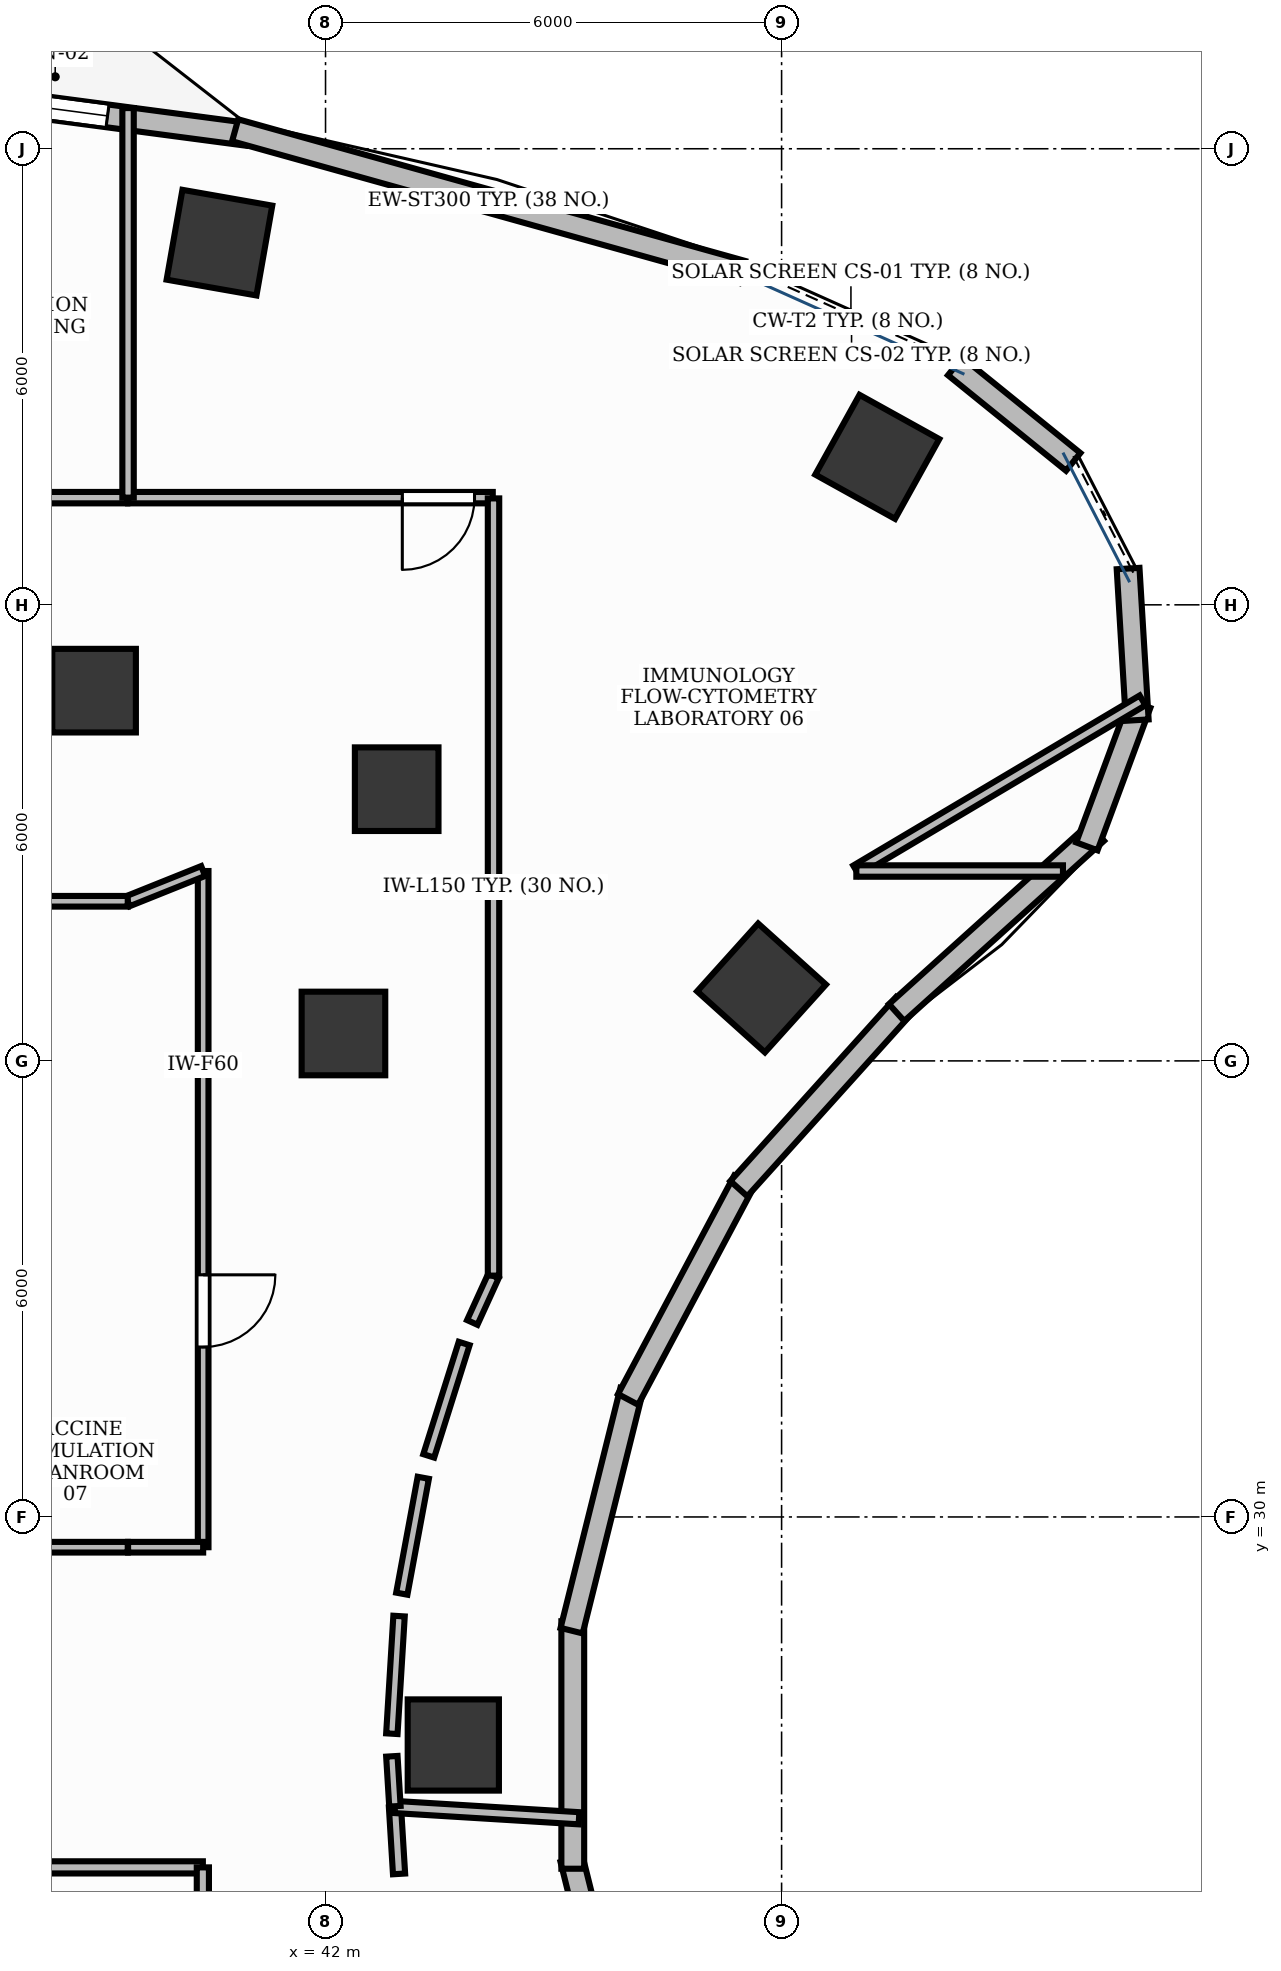
"""IFC4 building model, lengths in metres.
Left out: names, types, materials, properties, quantities, classifications, styles, units other than length and angle.
Written with IfcOpenShell. Run it as: python <this file> out.ifc"""

import sys

from ifc_helpers import new_model, si_unit, direction, frame, frame_2d, origin, origin_2d, place, context, subcontext, project, spatial, rectangle, extrude, element, fill, save


model = new_model("IFC4")
c1 = context("Model", 3, precision=1e-05, world=origin(), true_north=direction((0.0, 1.0)))
c2 = subcontext(c1, "Body", "Model", "MODEL_VIEW")
j1 = project(units=[si_unit("LENGTHUNIT", "METRE"), si_unit("PLANEANGLEUNIT", "RADIAN")], contexts=[c1])
p1 = place(None, origin())
s1 = spatial("IfcSite", under=j1, at=p1, CompositionType="ELEMENT")
p2 = place(p1, origin())
s2 = spatial("IfcBuilding", under=s1, at=p2, CompositionType="ELEMENT")
p3 = place(p2, frame((0.0, 0.0, 94.2)))
s3 = spatial("IfcBuildingStorey", under=s2, at=p3, CompositionType="ELEMENT", Elevation=94.2)
p4 = place(p3, frame((49.259, 43.947, -0.0), z_axis=(0.0, 0.0, 1.0), x_axis=(-0.874535078577, 0.484962262797, 0.0)))
e1 = element("IfcColumn", 1, at=p4, inside=s3, PredefinedType="COLUMN", context=c2, shape_type="SweptSolid", body=[
    extrude(rectangle(XDim=1.2, YDim=1.2, at=origin_2d()), origin(), (0.0, 0.0, 1.0), 3.901),
])
p5 = place(p3, frame((42.936, 39.575, -0.0), z_axis=(0.0, 0.0, 1.0), x_axis=(1.0, 0.0, 0.0)))
e2 = element("IfcColumn", 2, at=p5, inside=s3, PredefinedType="COLUMN", context=c2, shape_type="SweptSolid", body=[
    extrude(rectangle(XDim=1.1, YDim=1.1, at=origin_2d()), origin(), (0.0, 0.0, 1.0), 3.901),
])
p6 = place(p3, frame((40.604, 46.765, -0.0), z_axis=(0.0, 0.0, 1.0), x_axis=(-0.984868307662, 0.173304404339, 0.0)))
e3 = element("IfcColumn", 3, at=p6, inside=s3, PredefinedType="COLUMN", context=c2, shape_type="SweptSolid", body=[
    extrude(rectangle(XDim=1.2, YDim=1.2, at=origin_2d()), origin(), (0.0, 0.0, 1.0), 3.901),
])
p7 = place(p3, frame((38.955, 40.871, -0.0), z_axis=(0.0, 0.0, 1.0), x_axis=(1.0, 0.0, 0.0)))
e4 = element("IfcColumn", 4, at=p7, inside=s3, PredefinedType="COLUMN", context=c2, shape_type="SweptSolid", body=[
    extrude(rectangle(XDim=1.1, YDim=1.1, at=origin_2d()), origin(), (0.0, 0.0, 1.0), 3.901),
])
for number, where, z_axis, x_axis in (
    (5, (43.681, 27.0, -0.0), (0.0, 0.0, 1.0), (0.0, 1.0, 0.0)),
    (6, (47.736, 36.96, -0.0), (0.0, 0.0, 1.0), (0.669, 0.743, 0.0)),
):
    element("IfcColumn", number, at=place(p3, frame(where, z_axis=z_axis, x_axis=x_axis)), inside=s3, PredefinedType="COLUMN", context=c2, shape_type="SweptSolid", body=[
        extrude(rectangle(XDim=1.2, YDim=1.2, at=origin_2d()), origin(), (0.0, 0.0, 1.0), 3.901),
    ])
p8 = place(p3, frame((42.236, 36.361, -0.0), z_axis=(0.0, 0.0, 1.0), x_axis=(1.0, 0.0, 0.0)))
e7 = element("IfcColumn", 7, at=p8, inside=s3, PredefinedType="COLUMN", context=c2, shape_type="SweptSolid", body=[
    extrude(rectangle(XDim=1.1, YDim=1.1, at=origin_2d()), origin(), (0.0, 0.0, 1.0), 3.901),
])
p9 = place(p3, frame((40.964, 48.19, 0.0), z_axis=(0.0, 0.0, 1.0), x_axis=(-0.991369257822, 0.131099178664, 0.0)))
e8 = element("IfcWall", 8, at=p9, inside=s3, PredefinedType="STANDARD", context=c2, shape_type="SweptSolid", body=[
    extrude(rectangle(XDim=3.575, YDim=0.3, at=frame_2d((1.788, 0.0))), origin(), (0.0, 0.0, 1.0), 3.47),
])
p10 = place(p9, frame((1.848, 0.0, 0.95)))
e9 = element("IfcOpeningElement", 9, at=p10, cuts=e8, PredefinedType="OPENING", context=c2, shape_type="SweptSolid", body=[
    extrude(rectangle(XDim=1.5, YDim=1.8, at=frame_2d((0.75, 0.9))), frame((0.0, 0.165, 0.0), z_axis=(0.0, -1.0, 0.0), x_axis=(1.0, 0.0, 0.0)), (0.0, 0.0, 1.0), 0.33),
])
p11 = place(p3, frame((47.479, 46.38, 0.0), z_axis=(0.0, 0.0, 1.0), x_axis=(-0.963116215402, 0.269085777459, 0.0)))
e10 = element("IfcWall", 10, at=p11, inside=s3, PredefinedType="STANDARD", context=c2, shape_type="SweptSolid", body=[
    extrude(rectangle(XDim=6.924, YDim=0.3, at=frame_2d((3.462, 0.0))), origin(), (0.0, 0.0, 1.0), 3.9),
])
p12 = place(p3, frame((46.025, 22.337, 0.0), z_axis=(0.0, 0.0, 1.0), x_axis=(-0.241900409149, 0.970301083197, 0.0)))
e11 = element("IfcWall", 11, at=p12, inside=s3, PredefinedType="STANDARD", context=c2, shape_type="SweptSolid", body=[
    extrude(rectangle(XDim=3.256, YDim=0.3, at=frame_2d((1.628, 0.0))), origin(), (0.0, 0.0, 1.0), 3.9),
])
p13 = place(p3, frame((45.253, 25.372, 0.0), z_axis=(0.0, 0.0, 1.0), x_axis=(0.0, 1.0, 0.0)))
e12 = element("IfcWall", 12, at=p13, inside=s3, PredefinedType="STANDARD", context=c2, shape_type="SweptSolid", body=[
    extrude(rectangle(XDim=3.255, YDim=0.3, at=frame_2d((1.628, 0.0))), origin(), (0.0, 0.0, 1.0), 3.9),
])
p14 = place(p3, frame((45.238, 28.504, 0.0), z_axis=(0.0, 0.0, 1.0), x_axis=(0.241900409149, 0.970301083197, 0.0)))
e13 = element("IfcWall", 13, at=p14, inside=s3, PredefinedType="STANDARD", context=c2, shape_type="SweptSolid", body=[
    extrude(rectangle(XDim=3.256, YDim=0.3, at=frame_2d((1.628, 0.0))), origin(), (0.0, 0.0, 1.0), 3.9),
])
p15 = place(p3, frame((45.98, 31.547, 0.0), z_axis=(0.0, 0.0, 1.0), x_axis=(0.469451284634, 0.882958374645, 0.0)))
e14 = element("IfcWall", 14, at=p15, inside=s3, PredefinedType="STANDARD", context=c2, shape_type="SweptSolid", body=[
    extrude(rectangle(XDim=3.256, YDim=0.3, at=frame_2d((1.628, 0.0))), origin(), (0.0, 0.0, 1.0), 3.9),
])
p16 = place(p3, frame((47.437, 34.319, 0.0), z_axis=(0.0, 0.0, 1.0), x_axis=(0.669167727967, 0.743111399353, 0.0)))
e15 = element("IfcWall", 15, at=p16, inside=s3, PredefinedType="STANDARD", context=c2, shape_type="SweptSolid", body=[
    extrude(rectangle(XDim=3.255, YDim=0.3, at=frame_2d((1.628, 0.0))), origin(), (0.0, 0.0, 1.0), 3.9),
])
p17 = place(p3, frame((49.513, 36.636, 0.0), z_axis=(0.0, 0.0, 1.0), x_axis=(0.74255963233, 0.669779958221, 0.0)))
e16 = element("IfcWall", 16, at=p17, inside=s3, PredefinedType="STANDARD", context=c2, shape_type="SweptSolid", body=[
    extrude(rectangle(XDim=3.539, YDim=0.3, at=frame_2d((1.77, 0.0))), origin(), (0.0, 0.0, 1.0), 3.9),
])
p18 = place(p3, frame((52.016, 38.822, 0.0), z_axis=(0.0, 0.0, 1.0), x_axis=(0.347370087337, 0.937728117539, 0.0)))
e17 = element("IfcWall", 17, at=p18, inside=s3, PredefinedType="STANDARD", context=c2, shape_type="SweptSolid", body=[
    extrude(rectangle(XDim=1.997, YDim=0.3, at=frame_2d((0.999, 0.0))), origin(), (0.0, 0.0, 1.0), 3.9),
])
for number, where, z_axis, x_axis in (
    (18, (52.679, 40.483, 0.0), (0.0, 0.0, 1.0), (-0.06, 0.998, 0.0)),
    (19, (51.836, 43.881, 0.0), (0.0, 0.0, 1.0), (-0.777, 0.629, 0.0)),
):
    element("IfcWall", number, at=place(p3, frame(where, z_axis=z_axis, x_axis=x_axis)), inside=s3, PredefinedType="STANDARD", context=c2, shape_type="SweptSolid", body=[
        extrude(rectangle(XDim=1.998, YDim=0.3, at=frame_2d((0.999, 0.0))), origin(), (0.0, 0.0, 1.0), 3.9),
    ])
p19 = place(p3, frame((44.2, 43.41, 0.0), z_axis=(0.0, 0.0, 1.0), x_axis=(-1.0, 0.0, 0.0)))
e20 = element("IfcWall", 20, at=p19, inside=s3, PredefinedType="PARTITIONING", context=c2, shape_type="SweptSolid", body=[
    extrude(rectangle(XDim=4.798, YDim=0.15, at=frame_2d((2.399, 0.0))), origin(), (0.0, 0.0, 1.0), 2.91),
])
p20 = place(p19, frame((0.24, 0.0, 0.0)))
e21 = element("IfcOpeningElement", 21, at=p20, cuts=e20, PredefinedType="OPENING", context=c2, shape_type="SweptSolid", body=[
    extrude(rectangle(XDim=0.95, YDim=2.15, at=frame_2d((0.475, 1.075))), frame((0.0, 0.09, 0.0), z_axis=(0.0, -1.0, 0.0), x_axis=(1.0, 0.0, 0.0)), (0.0, 0.0, 1.0), 0.18),
])
p21 = place(p3, frame((40.39, 38.498, 0.0), z_axis=(0.0, 0.0, 1.0), x_axis=(0.0, -1.0, 0.0)))
e22 = element("IfcWall", 22, at=p21, inside=s3, PredefinedType="PARTITIONING", context=c2, shape_type="SweptSolid", body=[
    extrude(rectangle(XDim=8.896, YDim=0.14, at=frame_2d((4.448, 0.0))), origin(), (0.0, 0.0, 1.0), 2.91),
])
p22 = place(p21, frame((5.312, 0.0, 0.0)))
e23 = element("IfcOpeningElement", 23, at=p22, cuts=e22, PredefinedType="OPENING", context=c2, shape_type="SweptSolid", body=[
    extrude(rectangle(XDim=0.95, YDim=2.15, at=frame_2d((0.475, 1.075))), frame((0.0, 0.085, 0.0), z_axis=(0.0, -1.0, 0.0), x_axis=(1.0, 0.0, 0.0)), (0.0, 0.0, 1.0), 0.17),
])
p23 = place(p3, frame((39.392, 43.41, 0.0), z_axis=(0.0, 0.0, 1.0), x_axis=(-1.0, 0.0, 0.0)))
e24 = element("IfcWall", 24, at=p23, inside=s3, PredefinedType="PARTITIONING", context=c2, shape_type="SweptSolid", body=[
    extrude(rectangle(XDim=4.196, YDim=0.15, at=frame_2d((2.098, 0.0))), origin(), (0.0, 0.0, 1.0), 2.91),
])
p24 = place(p23, frame((2.748, 0.0, 0.0)))
e25 = element("IfcOpeningElement", 25, at=p24, cuts=e24, PredefinedType="OPENING", context=c2, shape_type="SweptSolid", body=[
    extrude(rectangle(XDim=0.95, YDim=2.15, at=frame_2d((0.475, 1.075))), frame((0.0, 0.09, 0.0), z_axis=(0.0, -1.0, 0.0), x_axis=(1.0, 0.0, 0.0)), (0.0, 0.0, 1.0), 0.18),
])
p25 = place(p3, frame((42.967, 25.304, 0.0), z_axis=(0.0, 0.0, 1.0), x_axis=(-0.061188874166, 0.998126205286, 0.0)))
e26 = element("IfcWall", 26, at=p25, inside=s3, PredefinedType="PARTITIONING", context=c2, shape_type="SweptSolid", body=[
    extrude(rectangle(XDim=0.882, YDim=0.16, at=frame_2d((0.441, 0.0))), origin(), (0.0, 0.0, 1.0), 2.91),
])
p26 = place(p3, frame((42.913, 26.184, 0.0), z_axis=(0.0, 0.0, 1.0), x_axis=(0.998138916893, -0.060981165807, 0.0)))
e27 = element("IfcWall", 27, at=p26, inside=s3, PredefinedType="PARTITIONING", context=c2, shape_type="SweptSolid", body=[
    extrude(rectangle(XDim=2.426, YDim=0.16, at=frame_2d((1.213, 0.0))), origin(), (0.0, 0.0, 1.0), 2.91),
])
p27 = place(p3, frame((37.36, 25.39, 0.0), z_axis=(0.0, 0.0, 1.0), x_axis=(1.0, 0.0, 0.0)))
e28 = element("IfcWall", 28, at=p27, inside=s3, PredefinedType="PARTITIONING", context=c2, shape_type="SweptSolid", body=[
    extrude(rectangle(XDim=3.026, YDim=0.16, at=frame_2d((1.513, 0.0))), origin(), (0.0, 0.0, 1.0), 2.91),
])
p28 = place(p3, frame((40.386, 25.39, 0.0), z_axis=(0.0, 0.0, 1.0), x_axis=(0.0, -1.0, 0.0)))
e29 = element("IfcWall", 29, at=p28, inside=s3, PredefinedType="PARTITIONING", context=c2, shape_type="SweptSolid", body=[
    extrude(rectangle(XDim=1.388, YDim=0.16, at=frame_2d((0.694, 0.0))), origin(), (0.0, 0.0, 1.0), 2.91),
])
p29 = place(p3, frame((52.749, 40.743, 0.0), z_axis=(0.0, 0.0, 1.0), x_axis=(-0.85982416837, -0.510590246173, 0.0)))
e30 = element("IfcWall", 30, at=p29, inside=s3, PredefinedType="PARTITIONING", context=c2, shape_type="SweptSolid", body=[
    extrude(rectangle(XDim=4.382, YDim=0.15, at=frame_2d((2.191, 0.0))), origin(), (0.0, 0.0, 1.0), 2.91),
])
p30 = place(p3, frame((48.983, 38.498, 0.0), z_axis=(0.0, 0.0, 1.0), x_axis=(1.0, 0.0, 0.0)))
e31 = element("IfcWall", 31, at=p30, inside=s3, PredefinedType="PARTITIONING", context=c2, shape_type="SweptSolid", body=[
    extrude(rectangle(XDim=2.719, YDim=0.15, at=frame_2d((1.359, 0.0))), origin(), (0.0, 0.0, 1.0), 2.91),
])
p31 = place(p3, frame((42.913, 26.194, 0.0), z_axis=(0.0, 0.0, 1.0), x_axis=(-0.061177910387, 0.998126877346, 0.0)))
e32 = element("IfcWall", 32, at=p31, inside=s3, PredefinedType="PARTITIONING", context=c2, shape_type="SweptSolid", body=[
    extrude(rectangle(XDim=0.658, YDim=0.15, at=frame_2d((0.329, 0.0))), origin(), (0.0, 0.0, 1.0), 2.91),
])
p32 = place(p3, frame((42.873, 27.149, 0.0), z_axis=(0.0, 0.0, 1.0), x_axis=(0.061103659378, 0.99813142562, 0.0)))
e33 = element("IfcWall", 33, at=p32, inside=s3, PredefinedType="PARTITIONING", context=c2, shape_type="SweptSolid", body=[
    extrude(rectangle(XDim=1.55, YDim=0.15, at=frame_2d((0.775, 0.0))), origin(), (0.0, 0.0, 1.0), 2.91),
])
p33 = place(p3, frame((43.003, 28.991, 0.0), z_axis=(0.0, 0.0, 1.0), x_axis=(0.182168192784, 0.983267384559, 0.0)))
e34 = element("IfcWall", 34, at=p33, inside=s3, PredefinedType="PARTITIONING", context=c2, shape_type="SweptSolid", body=[
    extrude(rectangle(XDim=1.551, YDim=0.15, at=frame_2d((0.775, 0.0))), origin(), (0.0, 0.0, 1.0), 2.91),
])
p34 = place(p3, frame((43.358, 30.803, 0.0), z_axis=(0.0, 0.0, 1.0), x_axis=(0.300641414783, 0.953737248783, 0.0)))
e35 = element("IfcWall", 35, at=p34, inside=s3, PredefinedType="PARTITIONING", context=c2, shape_type="SweptSolid", body=[
    extrude(rectangle(XDim=1.55, YDim=0.15, at=frame_2d((0.775, 0.0))), origin(), (0.0, 0.0, 1.0), 2.91),
])
p35 = place(p3, frame((43.93, 32.559, 0.0), z_axis=(0.0, 0.0, 1.0), x_axis=(0.414377467152, 0.910105111905, 0.0)))
e36 = element("IfcWall", 36, at=p35, inside=s3, PredefinedType="PARTITIONING", context=c2, shape_type="SweptSolid", body=[
    extrude(rectangle(XDim=0.672, YDim=0.15, at=frame_2d((0.336, 0.0))), origin(), (0.0, 0.0, 1.0), 2.91),
])
p36 = place(p3, frame((44.21, 33.175, 0.0), z_axis=(0.0, 0.0, 1.0), x_axis=(0.0, 1.0, 0.0)))
e37 = element("IfcWall", 37, at=p36, inside=s3, PredefinedType="PARTITIONING", context=c2, shape_type="SweptSolid", body=[
    extrude(rectangle(XDim=10.225, YDim=0.15, at=frame_2d((5.112, 0.0))), origin(), (0.0, 0.0, 1.0), 2.91),
])
p37 = place(p3, frame((39.402, 43.41, 0.0), z_axis=(0.0, 0.0, 1.0), x_axis=(0.0, 1.0, 0.0)))
e38 = element("IfcWall", 38, at=p37, inside=s3, PredefinedType="PARTITIONING", context=c2, shape_type="SweptSolid", body=[
    extrude(rectangle(XDim=5.125, YDim=0.15, at=frame_2d((2.563, 0.0))), origin(), (0.0, 0.0, 1.0), 2.91),
])
p38 = place(p3, frame((39.398, 38.1, 0.0), z_axis=(0.0, 0.0, 1.0), x_axis=(0.928098124006, 0.372335698284, 0.0)))
e39 = element("IfcWall", 39, at=p38, inside=s3, PredefinedType="PARTITIONING", context=c2, shape_type="SweptSolid", body=[
    extrude(rectangle(XDim=1.069, YDim=0.14, at=frame_2d((0.534, 0.0))), origin(), (0.0, 0.0, 1.0), 2.91),
])
p39 = place(p3, frame((40.39, 29.602, 0.0), z_axis=(0.0, 0.0, 1.0), x_axis=(-1.0, 0.0, 0.0)))
e40 = element("IfcWall", 40, at=p39, inside=s3, PredefinedType="PARTITIONING", context=c2, shape_type="SweptSolid", body=[
    extrude(rectangle(XDim=0.988, YDim=0.14, at=frame_2d((0.494, 0.0))), origin(), (0.0, 0.0, 1.0), 2.91),
])
p40 = place(p3, frame((39.398, 29.602, 0.0), z_axis=(0.0, 0.0, 1.0), x_axis=(-1.0, 0.0, 0.0)))
e41 = element("IfcWall", 41, at=p40, inside=s3, PredefinedType="PARTITIONING", context=c2, shape_type="SweptSolid", body=[
    extrude(rectangle(XDim=2.038, YDim=0.14, at=frame_2d((1.019, 0.0))), origin(), (0.0, 0.0, 1.0), 2.91),
])
p41 = place(p3, frame((37.21, 38.1, 0.0), z_axis=(0.0, 0.0, 1.0), x_axis=(1.0, 0.0, 0.0)))
e42 = element("IfcWall", 42, at=p41, inside=s3, PredefinedType="PARTITIONING", context=c2, shape_type="SweptSolid", body=[
    extrude(rectangle(XDim=2.188, YDim=0.14, at=frame_2d((1.094, 0.0))), origin(), (0.0, 0.0, 1.0), 2.91),
])
p42 = place(p10, origin())
e43 = element("IfcWindow", 43, at=p42, inside=s3, PartitioningType="DOUBLE_PANEL_VERTICAL", PredefinedType="WINDOW", context=c2, shape_type="SweptSolid", body=[
    extrude(rectangle(XDim=1.5, YDim=1.8, at=frame_2d((0.75, 0.9))), frame((0.0, 0.03, 0.0), z_axis=(0.0, -1.0, 0.0), x_axis=(1.0, 0.0, 0.0)), (0.0, 0.0, 1.0), 0.06),
])
fill(e9, e43)
p43 = place(p20, origin())
e44 = element("IfcDoor", 44, at=p43, inside=s3, OperationType="SINGLE_SWING_RIGHT", PredefinedType="DOOR", context=c2, shape_type="SweptSolid", body=[
    extrude(rectangle(XDim=0.95, YDim=2.15, at=frame_2d((0.475, 1.075))), frame((0.0, 0.025, 0.0), z_axis=(0.0, -1.0, 0.0), x_axis=(1.0, 0.0, 0.0)), (0.0, 0.0, 1.0), 0.05),
])
fill(e21, e44)
p44 = place(p22, origin())
e45 = element("IfcDoor", 45, at=p44, inside=s3, OperationType="SINGLE_SWING_LEFT", PredefinedType="DOOR", context=c2, shape_type="SweptSolid", body=[
    extrude(rectangle(XDim=0.95, YDim=2.15, at=frame_2d((0.475, 1.075))), frame((0.0, 0.025, 0.0), z_axis=(0.0, -1.0, 0.0), x_axis=(1.0, 0.0, 0.0)), (0.0, 0.0, 1.0), 0.05),
])
fill(e23, e45)
save(model, sys.argv[1])
